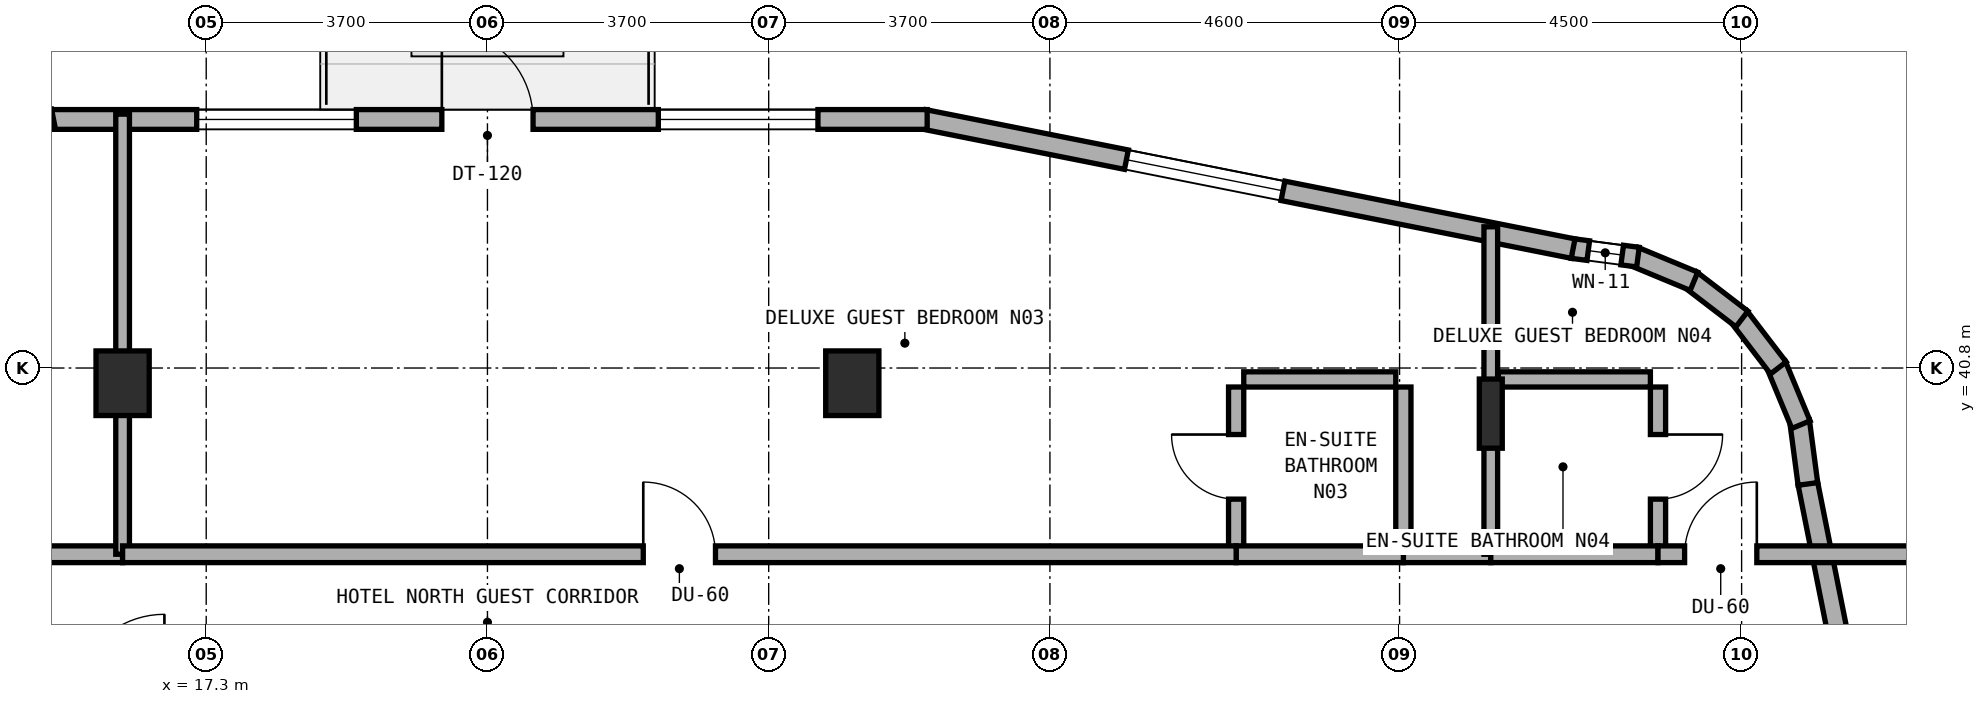
"""IFC4 building model, lengths in metres.
Left out: names, types, materials, properties, quantities, classifications, styles, units other than length and angle.
Written with IfcOpenShell. Run it as: python <this file> out.ifc"""

import sys

from ifc_helpers import new_model, si_unit, direction, frame, frame_2d, origin, origin_2d, place, context, subcontext, project, spatial, rectangle, i_section, extrude, element, fill, save


model = new_model("IFC4")
c1 = context("Model", 3, precision=1e-05, world=origin(), true_north=direction((0.0, 1.0)))
c2 = subcontext(c1, "Body", "Model", "MODEL_VIEW")
j1 = project(units=[si_unit("LENGTHUNIT", "METRE"), si_unit("PLANEANGLEUNIT", "RADIAN")], contexts=[c1])
p1 = place(None, origin())
s1 = spatial("IfcSite", under=j1, at=p1, CompositionType="ELEMENT")
p2 = place(p1, origin())
s2 = spatial("IfcBuilding", under=s1, at=p2, CompositionType="ELEMENT")
p3 = place(p2, frame((0.0, 0.0, 199.1)))
s3 = spatial("IfcBuildingStorey", under=s2, at=p3, CompositionType="ELEMENT", Elevation=199.1)
for number, where, z_axis, x_axis in (
    (1, (16.2, 40.6, 0.0), (0.0, 0.0, 1.0), (1.0, 0.0, 0.0)),
    (2, (25.8, 40.6, 0.0), (0.0, 0.0, 1.0), (1.0, 0.0, 0.0)),
):
    element("IfcColumn", number, at=place(p3, frame(where, z_axis=z_axis, x_axis=x_axis)), inside=s3, PredefinedType="COLUMN", context=c2, shape_type="SweptSolid", body=[
        extrude(rectangle(XDim=0.7, YDim=0.85, at=origin_2d()), origin(), (0.0, 0.0, 1.0), 3.6),
    ])
p4 = place(p3, frame((34.2, 40.2, 0.0), z_axis=(0.0, 0.0, 1.0), x_axis=(1.0, 0.0, 0.0)))
e3 = element("IfcColumn", 3, at=p4, inside=s3, PredefinedType="COLUMN", context=c2, shape_type="SweptSolid", body=[
    extrude(i_section(OverallWidth=0.302, OverallDepth=0.91, WebThickness=0.021, FlangeThickness=0.04, FilletRadius=0.03, at=origin_2d()), origin(), (0.0, 0.0, 1.0), 3.6),
])
p5 = place(p3, frame((40.084, 30.681, 0.0), z_axis=(0.0, 0.0, 1.0), x_axis=(-0.195291715883, 0.980745199176, 0.0)))
e4 = element("IfcWall", 4, at=p5, inside=s3, PredefinedType="STANDARD", context=c2, shape_type="SweptSolid", body=[
    extrude(rectangle(XDim=8.771, YDim=0.26, at=frame_2d((4.385, 0.0))), origin(), (0.0, 0.0, 1.0), 3.32),
])
p6 = place(p5, frame((2.798, 0.0, 0.85)))
e5 = element("IfcOpeningElement", 5, at=p6, cuts=e4, PredefinedType="OPENING", context=c2, shape_type="SweptSolid", body=[
    extrude(rectangle(XDim=2.1, YDim=1.5, at=frame_2d((1.05, 0.75))), frame((0.0, 0.14, 0.0), z_axis=(0.0, -1.0, 0.0), x_axis=(1.0, 0.0, 0.0)), (0.0, 0.0, 1.0), 0.28),
])
p7 = place(p3, frame((38.372, 39.275, 0.0), z_axis=(0.0, 0.0, 1.0), x_axis=(-0.130954667764, 0.9913883573, 0.0)))
e6 = element("IfcWall", 6, at=p7, inside=s3, PredefinedType="STANDARD", context=c2, shape_type="SweptSolid", body=[
    extrude(rectangle(XDim=0.833, YDim=0.26, at=frame_2d((0.417, 0.0))), origin(), (0.0, 0.0, 1.0), 3.32),
])
p8 = place(p3, frame((38.281, 40.055, 0.0), z_axis=(0.0, 0.0, 1.0), x_axis=(-0.382985169477, 0.923754491172, 0.0)))
e7 = element("IfcWall", 7, at=p8, inside=s3, PredefinedType="STANDARD", context=c2, shape_type="SweptSolid", body=[
    extrude(rectangle(XDim=0.851, YDim=0.26, at=frame_2d((0.426, 0.0))), origin(), (0.0, 0.0, 1.0), 3.32),
])
for number, where, z_axis, x_axis in (
    (8, (37.983, 40.801, 0.0), (0.0, 0.0, 1.0), (-0.608, 0.794, 0.0)),
    (9, (37.504, 41.445, 0.0), (0.0, 0.0, 1.0), (-0.794, 0.608, 0.0)),
):
    element("IfcWall", number, at=place(p3, frame(where, z_axis=z_axis, x_axis=x_axis)), inside=s3, PredefinedType="STANDARD", context=c2, shape_type="SweptSolid", body=[
        extrude(rectangle(XDim=0.85, YDim=0.26, at=frame_2d((0.425, 0.0))), origin(), (0.0, 0.0, 1.0), 3.32),
    ])
p9 = place(p3, frame((36.873, 41.941, 0.0), z_axis=(0.0, 0.0, 1.0), x_axis=(-0.923652976167, 0.383229930484, 0.0)))
e10 = element("IfcWall", 10, at=p9, inside=s3, PredefinedType="STANDARD", context=c2, shape_type="SweptSolid", body=[
    extrude(rectangle(XDim=0.851, YDim=0.26, at=frame_2d((0.426, 0.0))), origin(), (0.0, 0.0, 1.0), 3.32),
])
p10 = place(p3, frame((36.136, 42.259, 0.0), z_axis=(0.0, 0.0, 1.0), x_axis=(-0.991493480548, 0.130156359936, 0.0)))
e11 = element("IfcWall", 11, at=p10, inside=s3, PredefinedType="STANDARD", context=c2, shape_type="SweptSolid", body=[
    extrude(rectangle(XDim=0.868, YDim=0.26, at=frame_2d((0.434, 0.0))), origin(), (0.0, 0.0, 1.0), 3.32),
])
p11 = place(p10, frame((0.209, 0.0, 0.85)))
e12 = element("IfcOpeningElement", 12, at=p11, cuts=e11, PredefinedType="OPENING", context=c2, shape_type="SweptSolid", body=[
    extrude(rectangle(XDim=0.45, YDim=1.5, at=frame_2d((0.225, 0.75))), frame((0.0, 0.14, 0.0), z_axis=(0.0, -1.0, 0.0), x_axis=(1.0, 0.0, 0.0)), (0.0, 0.0, 1.0), 0.28),
])
p12 = place(p3, frame((35.283, 42.371, 0.0), z_axis=(0.0, 0.0, 1.0), x_axis=(-0.980748582507, 0.1952747242, 0.0)))
e13 = element("IfcWall", 13, at=p12, inside=s3, PredefinedType="STANDARD", context=c2, shape_type="SweptSolid", body=[
    extrude(rectangle(XDim=8.705, YDim=0.26, at=frame_2d((4.353, 0.0))), origin(), (0.0, 0.0, 1.0), 3.32),
])
p13 = place(p12, frame((3.892, 0.0, 0.85)))
e14 = element("IfcOpeningElement", 14, at=p13, cuts=e13, PredefinedType="OPENING", context=c2, shape_type="SweptSolid", body=[
    extrude(rectangle(XDim=2.1, YDim=1.5, at=frame_2d((1.05, 0.75))), frame((0.0, 0.14, 0.0), z_axis=(0.0, -1.0, 0.0), x_axis=(1.0, 0.0, 0.0)), (0.0, 0.0, 1.0), 0.28),
])
p14 = place(p3, frame((26.785, 44.07, 0.0), z_axis=(0.0, 0.0, 1.0), x_axis=(-1.0, 0.0, 0.0)))
e15 = element("IfcWall", 15, at=p14, inside=s3, PredefinedType="STANDARD", context=c2, shape_type="SweptSolid", body=[
    extrude(rectangle(XDim=11.535, YDim=0.26, at=frame_2d((5.768, 0.0))), origin(), (0.0, 0.0, 1.0), 3.32),
])
p15 = place(p14, frame((5.185, 0.0, 0.0)))
e16 = element("IfcOpeningElement", 16, at=p15, cuts=e15, PredefinedType="OPENING", context=c2, shape_type="SweptSolid", body=[
    extrude(rectangle(XDim=1.2, YDim=2.15, at=frame_2d((0.6, 1.075))), frame((0.0, 0.14, 0.0), z_axis=(0.0, -1.0, 0.0), x_axis=(1.0, 0.0, 0.0)), (0.0, 0.0, 1.0), 0.28),
])
p16 = place(p14, frame((1.437, 0.0, 0.85)))
e17 = element("IfcOpeningElement", 17, at=p16, cuts=e15, PredefinedType="OPENING", context=c2, shape_type="SweptSolid", body=[
    extrude(rectangle(XDim=2.1, YDim=1.5, at=frame_2d((1.05, 0.75))), frame((0.0, 0.14, 0.0), z_axis=(0.0, -1.0, 0.0), x_axis=(1.0, 0.0, 0.0)), (0.0, 0.0, 1.0), 0.28),
])
p17 = place(p14, frame((7.51, 0.0, 0.85)))
e18 = element("IfcOpeningElement", 18, at=p17, cuts=e15, PredefinedType="OPENING", context=c2, shape_type="SweptSolid", body=[
    extrude(rectangle(XDim=2.1, YDim=1.5, at=frame_2d((1.05, 0.75))), frame((0.0, 0.14, 0.0), z_axis=(0.0, -1.0, 0.0), x_axis=(1.0, 0.0, 0.0)), (0.0, 0.0, 1.0), 0.28),
])
p18 = place(p3, frame((15.29, 44.078, 0.0), z_axis=(0.0, 0.0, 1.0), x_axis=(-0.980752174324, -0.195256683773, 0.0)))
e19 = element("IfcWall", 19, at=p18, inside=s3, PredefinedType="STANDARD", context=c2, shape_type="SweptSolid", body=[
    extrude(rectangle(XDim=8.741, YDim=0.26, at=frame_2d((4.371, 0.0))), origin(), (0.0, 0.0, 1.0), 3.32),
])
p19 = place(p18, frame((2.732, 0.0, 0.85)))
e20 = element("IfcOpeningElement", 20, at=p19, cuts=e19, PredefinedType="OPENING", context=c2, shape_type="SweptSolid", body=[
    extrude(rectangle(XDim=2.1, YDim=1.5, at=frame_2d((1.05, 0.75))), frame((0.0, 0.14, 0.0), z_axis=(0.0, -1.0, 0.0), x_axis=(1.0, 0.0, 0.0)), (0.0, 0.0, 1.0), 0.28),
])
p20 = place(p3, frame((11.15, 38.35, 0.0), z_axis=(0.0, 0.0, 1.0), x_axis=(1.0, 0.0, 0.0)))
e21 = element("IfcWall", 21, at=p20, inside=s3, PredefinedType="SOLIDWALL", context=c2, shape_type="SweptSolid", body=[
    extrude(rectangle(XDim=5.05, YDim=0.22, at=frame_2d((2.525, 0.0))), origin(), (0.0, 0.0, 1.0), 2.695),
])
p21 = place(p20, frame((2.05, 0.0, 0.0)))
e22 = element("IfcOpeningElement", 22, at=p21, cuts=e21, PredefinedType="OPENING", context=c2, shape_type="SweptSolid", body=[
    extrude(rectangle(XDim=0.95, YDim=2.1, at=frame_2d((0.475, 1.05))), frame((0.0, 0.12, 0.0), z_axis=(0.0, -1.0, 0.0), x_axis=(1.0, 0.0, 0.0)), (0.0, 0.0, 1.0), 0.24),
])
p22 = place(p3, frame((16.2, 38.35, 0.0), z_axis=(0.0, 0.0, 1.0), x_axis=(0.0, 1.0, 0.0)))
e23 = element("IfcWall", 23, at=p22, inside=s3, PredefinedType="SOLIDWALL", context=c2, shape_type="SweptSolid", body=[
    extrude(rectangle(XDim=5.79, YDim=0.18, at=frame_2d((2.895, 0.0))), origin(), (0.0, 0.0, 1.0), 2.695),
])
p23 = place(p3, frame((30.85, 38.45, 0.0), z_axis=(0.0, 0.0, 1.0), x_axis=(0.0, 1.0, 0.0)))
e24 = element("IfcWall", 24, at=p23, inside=s3, PredefinedType="PLUMBINGWALL", context=c2, shape_type="SweptSolid", body=[
    extrude(rectangle(XDim=2.1, YDim=0.2, at=frame_2d((1.05, 0.0))), origin(), (0.0, 0.0, 1.0), 3.015),
])
p24 = place(p23, frame((0.625, 0.0, 0.0)))
e25 = element("IfcOpeningElement", 25, at=p24, cuts=e24, PredefinedType="OPENING", context=c2, shape_type="SweptSolid", body=[
    extrude(rectangle(XDim=0.85, YDim=2.1, at=frame_2d((0.425, 1.05))), frame((0.0, 0.11, 0.0), z_axis=(0.0, -1.0, 0.0), x_axis=(1.0, 0.0, 0.0)), (0.0, 0.0, 1.0), 0.22),
])
p25 = place(p3, frame((30.95, 40.65, 0.0), z_axis=(0.0, 0.0, 1.0), x_axis=(1.0, 0.0, 0.0)))
e26 = element("IfcWall", 26, at=p25, inside=s3, PredefinedType="PLUMBINGWALL", context=c2, shape_type="SweptSolid", body=[
    extrude(rectangle(XDim=2.0, YDim=0.2, at=frame_2d((1.0, 0.0))), origin(), (0.0, 0.0, 1.0), 3.32),
])
p26 = place(p3, frame((33.05, 38.45, 0.0), z_axis=(0.0, 0.0, 1.0), x_axis=(0.0, 1.0, 0.0)))
e27 = element("IfcWall", 27, at=p26, inside=s3, PredefinedType="PLUMBINGWALL", context=c2, shape_type="SweptSolid", body=[
    extrude(rectangle(XDim=2.1, YDim=0.2, at=frame_2d((1.05, 0.0))), origin(), (0.0, 0.0, 1.0), 3.015),
])
p27 = place(p3, frame((33.05, 38.35, 0.0), z_axis=(0.0, 0.0, 1.0), x_axis=(1.0, 0.0, 0.0)))
e28 = element("IfcWall", 28, at=p27, inside=s3, PredefinedType="SOLIDWALL", context=c2, shape_type="SweptSolid", body=[
    extrude(rectangle(XDim=1.15, YDim=0.22, at=frame_2d((0.575, 0.0))), origin(), (0.0, 0.0, 1.0), 2.695),
])
p28 = place(p3, frame((30.85, 38.35, 0.0), z_axis=(0.0, 0.0, 1.0), x_axis=(1.0, 0.0, 0.0)))
e29 = element("IfcWall", 29, at=p28, inside=s3, PredefinedType="SOLIDWALL", context=c2, shape_type="SweptSolid", body=[
    extrude(rectangle(XDim=2.2, YDim=0.22, at=frame_2d((1.1, 0.0))), origin(), (0.0, 0.0, 1.0), 3.32),
])
p29 = place(p3, frame((16.2, 38.35, 0.0), z_axis=(0.0, 0.0, 1.0), x_axis=(1.0, 0.0, 0.0)))
e30 = element("IfcWall", 30, at=p29, inside=s3, PredefinedType="SOLIDWALL", context=c2, shape_type="SweptSolid", body=[
    extrude(rectangle(XDim=14.65, YDim=0.22, at=frame_2d((7.325, 0.0))), origin(), (0.0, 0.0, 1.0), 2.695),
])
p30 = place(p29, frame((6.85, 0.0, 0.0)))
e31 = element("IfcOpeningElement", 31, at=p30, cuts=e30, PredefinedType="OPENING", context=c2, shape_type="SweptSolid", body=[
    extrude(rectangle(XDim=0.95, YDim=2.1, at=frame_2d((0.475, 1.05))), frame((0.0, 0.12, 0.0), z_axis=(0.0, -1.0, 0.0), x_axis=(1.0, 0.0, 0.0)), (0.0, 0.0, 1.0), 0.24),
])
p31 = place(p3, frame((34.2, 38.35, 0.0), z_axis=(0.0, 0.0, 1.0), x_axis=(0.0, 1.0, 0.0)))
e32 = element("IfcWall", 32, at=p31, inside=s3, PredefinedType="SOLIDWALL", context=c2, shape_type="SweptSolid", body=[
    extrude(rectangle(XDim=4.308, YDim=0.18, at=frame_2d((2.154, 0.0))), origin(), (0.0, 0.0, 1.0), 2.695),
])
p32 = place(p3, frame((36.4, 38.45, 0.0), z_axis=(0.0, 0.0, 1.0), x_axis=(0.0, 1.0, 0.0)))
e33 = element("IfcWall", 33, at=p32, inside=s3, PredefinedType="PLUMBINGWALL", context=c2, shape_type="SweptSolid", body=[
    extrude(rectangle(XDim=2.1, YDim=0.2, at=frame_2d((1.05, 0.0))), origin(), (0.0, 0.0, 1.0), 3.32),
])
p33 = place(p32, frame((0.625, 0.0, 0.0)))
e34 = element("IfcOpeningElement", 34, at=p33, cuts=e33, PredefinedType="OPENING", context=c2, shape_type="SweptSolid", body=[
    extrude(rectangle(XDim=0.85, YDim=2.1, at=frame_2d((0.425, 1.05))), frame((0.0, 0.11, 0.0), z_axis=(0.0, -1.0, 0.0), x_axis=(1.0, 0.0, 0.0)), (0.0, 0.0, 1.0), 0.22),
])
p34 = place(p3, frame((34.3, 40.65, 0.0), z_axis=(0.0, 0.0, 1.0), x_axis=(1.0, 0.0, 0.0)))
e35 = element("IfcWall", 35, at=p34, inside=s3, PredefinedType="PLUMBINGWALL", context=c2, shape_type="SweptSolid", body=[
    extrude(rectangle(XDim=2.0, YDim=0.2, at=frame_2d((1.0, 0.0))), origin(), (0.0, 0.0, 1.0), 3.32),
])
p35 = place(p3, frame((34.2, 38.35, 0.0), z_axis=(0.0, 0.0, 1.0), x_axis=(1.0, 0.0, 0.0)))
e36 = element("IfcWall", 36, at=p35, inside=s3, PredefinedType="SOLIDWALL", context=c2, shape_type="SweptSolid", body=[
    extrude(rectangle(XDim=2.2, YDim=0.22, at=frame_2d((1.1, 0.0))), origin(), (0.0, 0.0, 1.0), 2.695),
])
p36 = place(p3, frame((36.4, 38.35, 0.0), z_axis=(0.0, 0.0, 1.0), x_axis=(1.0, 0.0, 0.0)))
e37 = element("IfcWall", 37, at=p36, inside=s3, PredefinedType="SOLIDWALL", context=c2, shape_type="SweptSolid", body=[
    extrude(rectangle(XDim=3.64, YDim=0.22, at=frame_2d((1.82, 0.0))), origin(), (0.0, 0.0, 1.0), 3.32),
])
p37 = place(p36, frame((0.35, 0.0, 0.0)))
e38 = element("IfcOpeningElement", 38, at=p37, cuts=e37, PredefinedType="OPENING", context=c2, shape_type="SweptSolid", body=[
    extrude(rectangle(XDim=0.95, YDim=2.1, at=frame_2d((0.475, 1.05))), frame((0.0, 0.12, 0.0), z_axis=(0.0, -1.0, 0.0), x_axis=(1.0, 0.0, 0.0)), (0.0, 0.0, 1.0), 0.24),
])
p38 = place(p13, origin())
e39 = element("IfcWindow", 39, at=p38, inside=s3, PartitioningType="SINGLE_PANEL", PredefinedType="WINDOW", context=c2, shape_type="SweptSolid", body=[
    extrude(rectangle(XDim=2.1, YDim=1.5, at=frame_2d((1.05, 0.75))), frame((0.0, 0.03, 0.0), z_axis=(0.0, -1.0, 0.0), x_axis=(1.0, 0.0, 0.0)), (0.0, 0.0, 1.0), 0.06),
])
fill(e14, e39)
p39 = place(p15, frame((1.2, 0.0, 0.0), z_axis=(0.0, 0.0, 1.0), x_axis=(-1.0, 0.0, 0.0)))
e40 = element("IfcDoor", 40, at=p39, inside=s3, OperationType="SINGLE_SWING_LEFT", PredefinedType="DOOR", context=c2, shape_type="SweptSolid", body=[
    extrude(rectangle(XDim=1.2, YDim=2.15, at=frame_2d((0.6, 1.075))), frame((0.0, 0.025, 0.0), z_axis=(0.0, -1.0, 0.0), x_axis=(1.0, 0.0, 0.0)), (0.0, 0.0, 1.0), 0.05),
])
fill(e16, e40)
p40 = place(p16, origin())
e41 = element("IfcWindow", 41, at=p40, inside=s3, PartitioningType="SINGLE_PANEL", PredefinedType="WINDOW", context=c2, shape_type="SweptSolid", body=[
    extrude(rectangle(XDim=2.1, YDim=1.5, at=frame_2d((1.05, 0.75))), frame((0.0, 0.03, 0.0), z_axis=(0.0, -1.0, 0.0), x_axis=(1.0, 0.0, 0.0)), (0.0, 0.0, 1.0), 0.06),
])
fill(e17, e41)
p41 = place(p17, origin())
e42 = element("IfcWindow", 42, at=p41, inside=s3, PartitioningType="SINGLE_PANEL", PredefinedType="WINDOW", context=c2, shape_type="SweptSolid", body=[
    extrude(rectangle(XDim=2.1, YDim=1.5, at=frame_2d((1.05, 0.75))), frame((0.0, 0.03, 0.0), z_axis=(0.0, -1.0, 0.0), x_axis=(1.0, 0.0, 0.0)), (0.0, 0.0, 1.0), 0.06),
])
fill(e18, e42)
p42 = place(p11, origin())
e43 = element("IfcWindow", 43, at=p42, inside=s3, PartitioningType="SINGLE_PANEL", PredefinedType="WINDOW", context=c2, shape_type="SweptSolid", body=[
    extrude(rectangle(XDim=0.45, YDim=1.5, at=frame_2d((0.225, 0.75))), frame((0.0, 0.03, 0.0), z_axis=(0.0, -1.0, 0.0), x_axis=(1.0, 0.0, 0.0)), (0.0, 0.0, 1.0), 0.06),
])
fill(e12, e43)
p43 = place(p24, origin())
e44 = element("IfcDoor", 44, at=p43, inside=s3, OperationType="SINGLE_SWING_RIGHT", PredefinedType="DOOR", context=c2, shape_type="SweptSolid", body=[
    extrude(rectangle(XDim=0.85, YDim=2.1, at=frame_2d((0.425, 1.05))), frame((0.0, 0.025, 0.0), z_axis=(0.0, -1.0, 0.0), x_axis=(1.0, 0.0, 0.0)), (0.0, 0.0, 1.0), 0.05),
])
fill(e25, e44)
p44 = place(p30, origin())
e45 = element("IfcDoor", 45, at=p44, inside=s3, OperationType="SINGLE_SWING_LEFT", PredefinedType="DOOR", context=c2, shape_type="SweptSolid", body=[
    extrude(rectangle(XDim=0.95, YDim=2.1, at=frame_2d((0.475, 1.05))), frame((0.0, 0.025, 0.0), z_axis=(0.0, -1.0, 0.0), x_axis=(1.0, 0.0, 0.0)), (0.0, 0.0, 1.0), 0.05),
])
fill(e31, e45)
p45 = place(p33, frame((0.85, 0.0, 0.0), z_axis=(0.0, 0.0, 1.0), x_axis=(-1.0, 0.0, 0.0)))
e46 = element("IfcDoor", 46, at=p45, inside=s3, OperationType="SINGLE_SWING_LEFT", PredefinedType="DOOR", context=c2, shape_type="SweptSolid", body=[
    extrude(rectangle(XDim=0.85, YDim=2.1, at=frame_2d((0.425, 1.05))), frame((0.0, 0.025, 0.0), z_axis=(0.0, -1.0, 0.0), x_axis=(1.0, 0.0, 0.0)), (0.0, 0.0, 1.0), 0.05),
])
fill(e34, e46)
p46 = place(p37, origin())
e47 = element("IfcDoor", 47, at=p46, inside=s3, OperationType="SINGLE_SWING_RIGHT", PredefinedType="DOOR", context=c2, shape_type="SweptSolid", body=[
    extrude(rectangle(XDim=0.95, YDim=2.1, at=frame_2d((0.475, 1.05))), frame((0.0, 0.025, 0.0), z_axis=(0.0, -1.0, 0.0), x_axis=(1.0, 0.0, 0.0)), (0.0, 0.0, 1.0), 0.05),
])
fill(e38, e47)
save(model, sys.argv[1])
